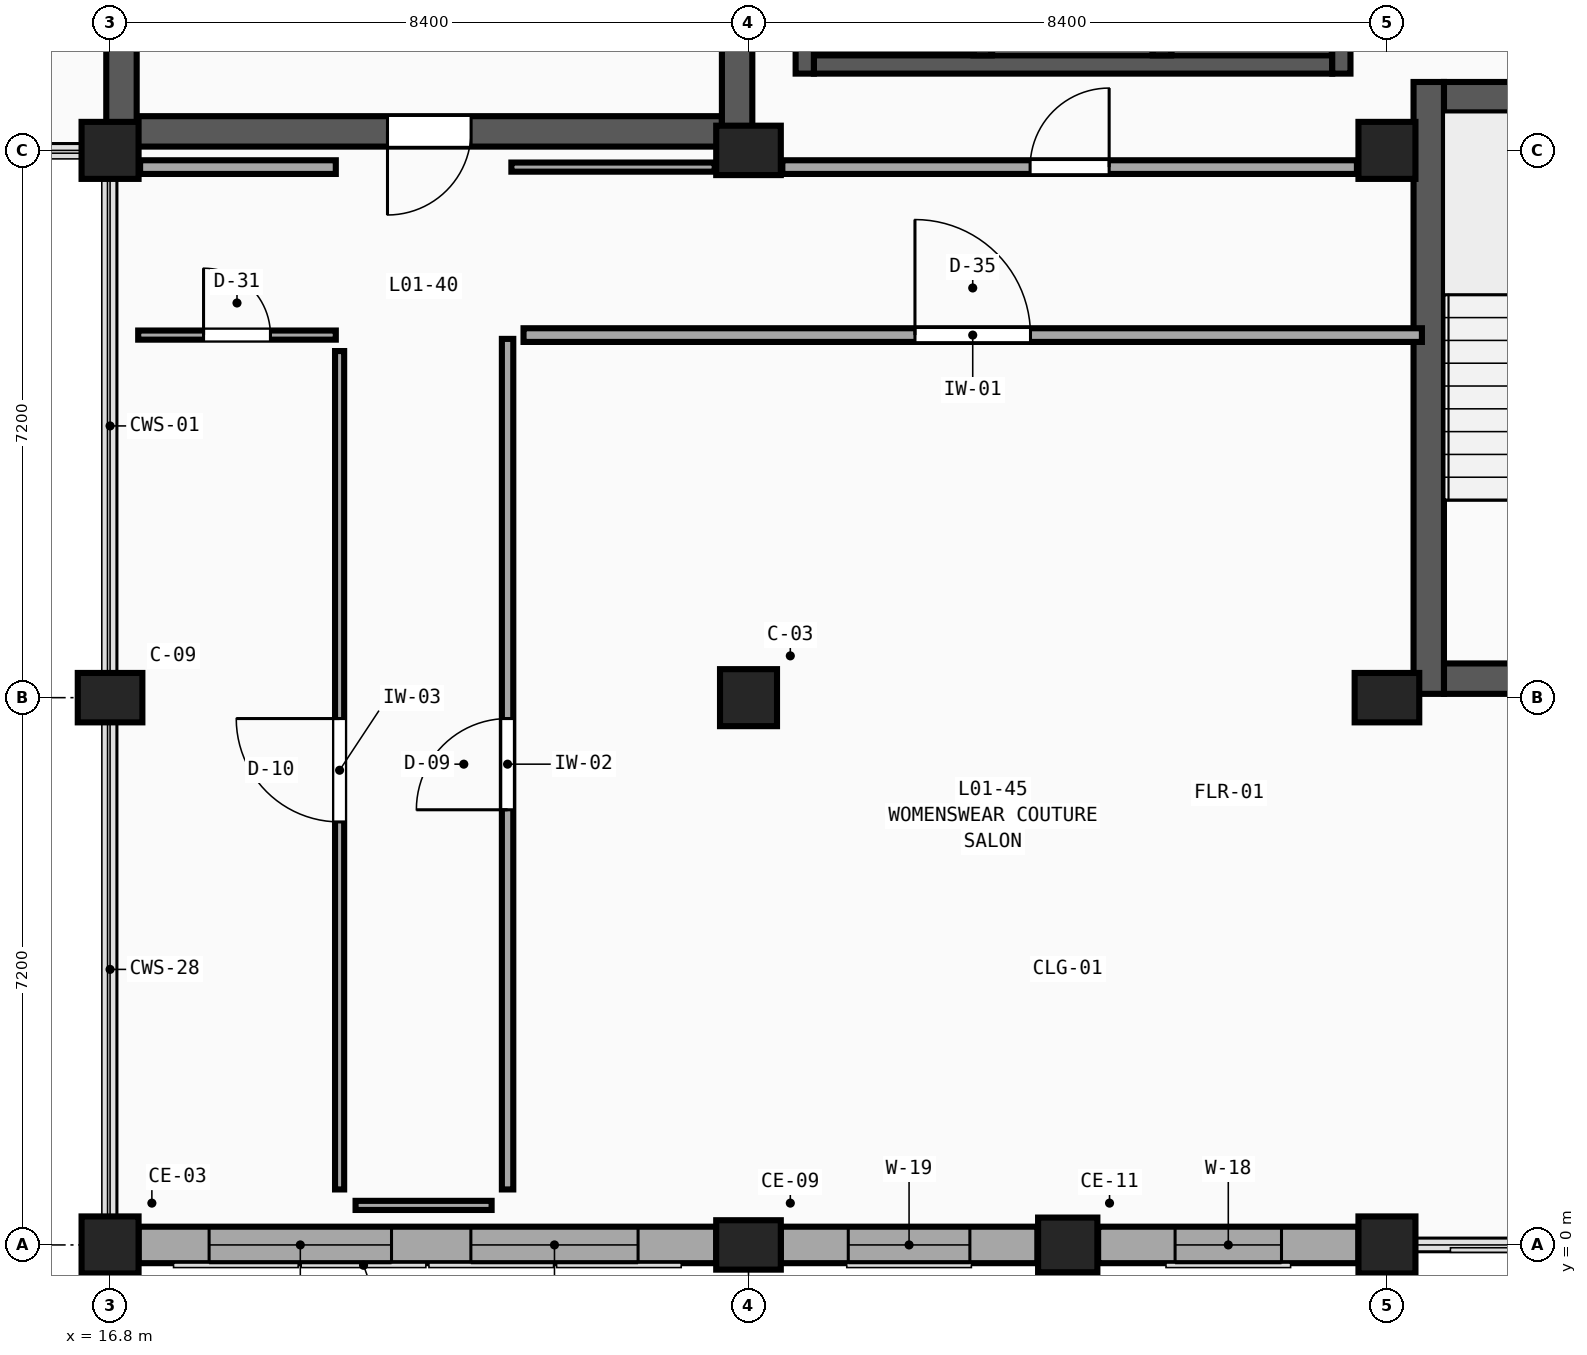
"""IFC4 building model, lengths in metres.
Left out: names, types, materials, properties, quantities, classifications, styles, units other than length and angle.
Written with IfcOpenShell. Run it as: python <this file> out.ifc"""

import sys

from ifc_helpers import new_model, si_unit, direction, frame, frame_2d, origin, origin_2d, place, context, subcontext, project, spatial, rectangle, extrude, element, fill, save


model = new_model("IFC4")
c1 = context("Model", 3, precision=1e-05, world=origin(), true_north=direction((0.0, 1.0)))
c2 = subcontext(c1, "Body", "Model", "MODEL_VIEW")
j1 = project(units=[si_unit("LENGTHUNIT", "METRE"), si_unit("PLANEANGLEUNIT", "RADIAN")], contexts=[c1])
p1 = place(None, origin())
s1 = spatial("IfcSite", under=j1, at=p1, CompositionType="ELEMENT")
p2 = place(p1, origin())
s2 = spatial("IfcBuilding", under=s1, at=p2, CompositionType="ELEMENT")
p3 = place(p2, frame((0.0, 0.0, 5.4)))
s3 = spatial("IfcBuildingStorey", under=s2, at=p3, CompositionType="ELEMENT", Elevation=5.4)
p4 = place(p3, frame((16.8, 0.0, 0.0), z_axis=(0.0, 0.0, 1.0), x_axis=(1.0, 0.0, 0.0)))
e1 = element("IfcColumn", 1, at=p4, inside=s3, PredefinedType="COLUMN", context=c2, shape_type="SweptSolid", body=[
    extrude(rectangle(XDim=0.75, YDim=0.75, at=origin_2d()), origin(), (0.0, 0.0, 1.0), 4.5),
])
p5 = place(p3, frame((16.8, 7.2, 0.0), z_axis=(0.0, 0.0, 1.0), x_axis=(1.0, 0.0, 0.0)))
e2 = element("IfcColumn", 2, at=p5, inside=s3, PredefinedType="COLUMN", context=c2, shape_type="SweptSolid", body=[
    extrude(rectangle(XDim=0.85, YDim=0.65, at=origin_2d()), origin(), (0.0, 0.0, 1.0), 4.5),
])
p6 = place(p3, frame((16.8, 14.4, 0.0), z_axis=(0.0, 0.0, 1.0), x_axis=(1.0, 0.0, 0.0)))
e3 = element("IfcColumn", 3, at=p6, inside=s3, PredefinedType="COLUMN", context=c2, shape_type="SweptSolid", body=[
    extrude(rectangle(XDim=0.75, YDim=0.75, at=origin_2d()), origin(), (0.0, 0.0, 1.0), 4.5),
])
p7 = place(p3, frame((25.2, 0.0, 0.0), z_axis=(0.0, 0.0, 1.0), x_axis=(1.0, 0.0, 0.0)))
e4 = element("IfcColumn", 4, at=p7, inside=s3, PredefinedType="COLUMN", context=c2, shape_type="SweptSolid", body=[
    extrude(rectangle(XDim=0.85, YDim=0.65, at=origin_2d()), origin(), (0.0, 0.0, 1.0), 4.5),
])
p8 = place(p3, frame((25.2, 7.2, 0.0), z_axis=(0.0, 0.0, 1.0), x_axis=(1.0, 0.0, 0.0)))
e5 = element("IfcColumn", 5, at=p8, inside=s3, PredefinedType="COLUMN", context=c2, shape_type="SweptSolid", body=[
    extrude(rectangle(XDim=0.75, YDim=0.75, at=origin_2d()), origin(), (0.0, 0.0, 1.0), 4.5),
])
p9 = place(p3, frame((25.2, 14.4, 0.0), z_axis=(0.0, 0.0, 1.0), x_axis=(1.0, 0.0, 0.0)))
e6 = element("IfcColumn", 6, at=p9, inside=s3, PredefinedType="COLUMN", context=c2, shape_type="SweptSolid", body=[
    extrude(rectangle(XDim=0.85, YDim=0.65, at=origin_2d()), origin(), (0.0, 0.0, 1.0), 4.5),
])
p10 = place(p3, frame((33.6, 0.0, 0.0), z_axis=(0.0, 0.0, 1.0), x_axis=(1.0, 0.0, 0.0)))
e7 = element("IfcColumn", 7, at=p10, inside=s3, PredefinedType="COLUMN", context=c2, shape_type="SweptSolid", body=[
    extrude(rectangle(XDim=0.75, YDim=0.75, at=origin_2d()), origin(), (0.0, 0.0, 1.0), 4.5),
])
p11 = place(p3, frame((33.6, 7.2, 0.0), z_axis=(0.0, 0.0, 1.0), x_axis=(1.0, 0.0, 0.0)))
e8 = element("IfcColumn", 8, at=p11, inside=s3, PredefinedType="COLUMN", context=c2, shape_type="SweptSolid", body=[
    extrude(rectangle(XDim=0.85, YDim=0.65, at=origin_2d()), origin(), (0.0, 0.0, 1.0), 4.5),
])
p12 = place(p3, frame((33.6, 14.4, 0.0), z_axis=(0.0, 0.0, 1.0), x_axis=(1.0, 0.0, 0.0)))
e9 = element("IfcColumn", 9, at=p12, inside=s3, PredefinedType="COLUMN", context=c2, shape_type="SweptSolid", body=[
    extrude(rectangle(XDim=0.75, YDim=0.75, at=origin_2d()), origin(), (0.0, 0.0, 1.0), 4.5),
])
p13 = place(p3, frame((29.4, 0.0, 0.0), z_axis=(0.0, 0.0, 1.0), x_axis=(1.0, 0.0, 0.0)))
e10 = element("IfcColumn", 10, at=p13, inside=s3, PredefinedType="PILASTER", context=c2, shape_type="SweptSolid", body=[
    extrude(rectangle(XDim=0.78, YDim=0.72, at=origin_2d()), origin(), (0.0, 0.0, 1.0), 4.5),
])
p14 = place(p3, frame((24.775, 0.0, 0.0), z_axis=(0.0, 0.0, 1.0), x_axis=(-1.0, 0.0, 0.0)))
e11 = element("IfcWall", 11, at=p14, inside=s3, PredefinedType="SOLIDWALL", context=c2, shape_type="SweptSolid", body=[
    extrude(rectangle(XDim=7.6, YDim=0.48, at=frame_2d((3.8, 0.0))), origin(), (0.0, 0.0, 1.0), 3.63),
])
p15 = place(p14, frame((1.028, 0.0, 0.75)))
e12 = element("IfcOpeningElement", 12, at=p15, cuts=e11, PredefinedType="OPENING", context=c2, shape_type="SweptSolid", body=[
    extrude(rectangle(XDim=2.2, YDim=2.08, at=frame_2d((1.1, 1.04))), frame((0.0, 0.26, 0.0), z_axis=(0.0, -1.0, 0.0), x_axis=(1.0, 0.0, 0.0)), (0.0, 0.0, 1.0), 0.52),
])
p16 = place(p14, frame((4.272, 0.0, 0.75)))
e13 = element("IfcOpeningElement", 13, at=p16, cuts=e11, PredefinedType="OPENING", context=c2, shape_type="SweptSolid", body=[
    extrude(rectangle(XDim=2.4, YDim=2.08, at=frame_2d((1.2, 1.04))), frame((0.0, 0.26, 0.0), z_axis=(0.0, -1.0, 0.0), x_axis=(1.0, 0.0, 0.0)), (0.0, 0.0, 1.0), 0.52),
])
p17 = place(p3, frame((33.225, 0.0, 0.0), z_axis=(0.0, 0.0, 1.0), x_axis=(-1.0, 0.0, 0.0)))
e14 = element("IfcWall", 14, at=p17, inside=s3, PredefinedType="SOLIDWALL", context=c2, shape_type="SweptSolid", body=[
    extrude(rectangle(XDim=3.425, YDim=0.48, at=frame_2d((1.712, 0.0))), origin(), (0.0, 0.0, 1.0), 3.63),
])
p18 = place(p17, frame((1.012, 0.0, 0.75)))
e15 = element("IfcOpeningElement", 15, at=p18, cuts=e14, PredefinedType="OPENING", context=c2, shape_type="SweptSolid", body=[
    extrude(rectangle(XDim=1.4, YDim=2.26, at=frame_2d((0.7, 1.13))), frame((0.0, 0.26, 0.0), z_axis=(0.0, -1.0, 0.0), x_axis=(1.0, 0.0, 0.0)), (0.0, 0.0, 1.0), 0.52),
])
p19 = place(p3, frame((29.0, 0.0, 0.0), z_axis=(0.0, 0.0, 1.0), x_axis=(-1.0, 0.0, 0.0)))
e16 = element("IfcWall", 16, at=p19, inside=s3, PredefinedType="SOLIDWALL", context=c2, shape_type="SweptSolid", body=[
    extrude(rectangle(XDim=3.375, YDim=0.48, at=frame_2d((1.688, 0.0))), origin(), (0.0, 0.0, 1.0), 3.63),
])
p20 = place(p19, frame((0.887, 0.0, 0.75)))
e17 = element("IfcOpeningElement", 17, at=p20, cuts=e16, PredefinedType="OPENING", context=c2, shape_type="SweptSolid", body=[
    extrude(rectangle(XDim=1.6, YDim=2.26, at=frame_2d((0.8, 1.13))), frame((0.0, 0.26, 0.0), z_axis=(0.0, -1.0, 0.0), x_axis=(1.0, 0.0, 0.0)), (0.0, 0.0, 1.0), 0.52),
])
p21 = place(p3, frame((24.85, 14.65, 0.0), z_axis=(0.0, 0.0, 1.0), x_axis=(-1.0, 0.0, 0.0)))
e18 = element("IfcWall", 18, at=p21, inside=s3, PredefinedType="SHEAR", context=c2, shape_type="SweptSolid", body=[
    extrude(rectangle(XDim=7.7, YDim=0.4, at=frame_2d((3.85, 0.0))), origin(), (0.0, 0.0, 1.0), 4.5),
])
p22 = place(p21, frame((3.3, 0.0, 0.0)))
e19 = element("IfcOpeningElement", 19, at=p22, cuts=e18, PredefinedType="OPENING", context=c2, shape_type="SweptSolid", body=[
    extrude(rectangle(XDim=1.1, YDim=2.2, at=frame_2d((0.55, 1.1))), frame((0.0, 0.22, 0.0), z_axis=(0.0, -1.0, 0.0), x_axis=(1.0, 0.0, 0.0)), (0.0, 0.0, 1.0), 0.44),
])
for number, where, z_axis, x_axis in (
    (20, (16.95, 22.9, 0.0), (0.0, 0.0, 1.0), (0.0, -1.0, 0.0)),
    (21, (25.05, 14.45, 0.0), (0.0, 0.0, 1.0), (0.0, 1.0, 0.0)),
):
    element("IfcWall", number, at=place(p3, frame(where, z_axis=z_axis, x_axis=x_axis)), inside=s3, PredefinedType="SHEAR", context=c2, shape_type="SweptSolid", body=[
        extrude(rectangle(XDim=8.45, YDim=0.4, at=frame_2d((4.225, 0.0))), origin(), (0.0, 0.0, 1.0), 4.5),
    ])
p23 = place(p3, frame((41.25, 7.45, 0.0), z_axis=(0.0, 0.0, 1.0), x_axis=(-1.0, 0.0, 0.0)))
e22 = element("IfcWall", 22, at=p23, inside=s3, PredefinedType="SHEAR", context=c2, shape_type="SweptSolid", body=[
    extrude(rectangle(XDim=6.9, YDim=0.4, at=frame_2d((3.45, 0.0))), origin(), (0.0, 0.0, 1.0), 4.5),
])
p24 = place(p23, frame((2.9, 0.0, 0.0)))
e23 = element("IfcOpeningElement", 23, at=p24, cuts=e22, PredefinedType="OPENING", context=c2, shape_type="SweptSolid", body=[
    extrude(rectangle(XDim=1.1, YDim=2.2, at=frame_2d((0.55, 1.1))), frame((0.0, 0.22, 0.0), z_axis=(0.0, -1.0, 0.0), x_axis=(1.0, 0.0, 0.0)), (0.0, 0.0, 1.0), 0.44),
])
p25 = place(p3, frame((34.35, 15.1, 0.0), z_axis=(0.0, 0.0, 1.0), x_axis=(1.0, 0.0, 0.0)))
e24 = element("IfcWall", 24, at=p25, inside=s3, PredefinedType="SHEAR", context=c2, shape_type="SweptSolid", body=[
    extrude(rectangle(XDim=6.9, YDim=0.4, at=frame_2d((3.45, 0.0))), origin(), (0.0, 0.0, 1.0), 4.5),
])
p26 = place(p3, frame((34.15, 15.3, 0.0), z_axis=(0.0, 0.0, 1.0), x_axis=(0.0, -1.0, 0.0)))
e25 = element("IfcWall", 25, at=p26, inside=s3, PredefinedType="SHEAR", context=c2, shape_type="SweptSolid", body=[
    extrude(rectangle(XDim=8.05, YDim=0.4, at=frame_2d((4.025, 0.0))), origin(), (0.0, 0.0, 1.0), 4.5),
])
p27 = place(p3, frame((26.06, 15.53, 0.0), z_axis=(0.0, 0.0, 1.0), x_axis=(1.0, 0.0, 0.0)))
e26 = element("IfcWall", 26, at=p27, inside=s3, PredefinedType="SHEAR", context=c2, shape_type="SweptSolid", body=[
    extrude(rectangle(XDim=6.82, YDim=0.24, at=frame_2d((3.41, 0.0))), origin(), (0.0, 0.0, 1.0), 4.18),
])
for number, where, z_axis, x_axis in (
    (27, (25.94, 18.39, 0.0), (0.0, 0.0, 1.0), (0.0, -1.0, 0.0)),
    (28, (33.0, 15.41, 0.0), (0.0, 0.0, 1.0), (0.0, 1.0, 0.0)),
):
    element("IfcWall", number, at=place(p3, frame(where, z_axis=z_axis, x_axis=x_axis)), inside=s3, PredefinedType="SHEAR", context=c2, shape_type="SweptSolid", body=[
        extrude(rectangle(XDim=2.98, YDim=0.24, at=frame_2d((1.49, 0.0))), origin(), (0.0, 0.0, 1.0), 4.18),
    ])
for number, where, z_axis, x_axis in (
    (29, (28.28, 15.65, 0.0), (0.0, 0.0, 1.0), (0.0, 1.0, 0.0)),
    (30, (30.64, 15.65, 0.0), (0.0, 0.0, 1.0), (0.0, 1.0, 0.0)),
):
    element("IfcWall", number, at=place(p3, frame(where, z_axis=z_axis, x_axis=x_axis)), inside=s3, PredefinedType="SHEAR", context=c2, shape_type="SweptSolid", body=[
        extrude(rectangle(XDim=2.5, YDim=0.24, at=frame_2d((1.25, 0.0))), origin(), (0.0, 0.0, 1.0), 4.18),
    ])
p28 = place(p3, frame((22.08, 14.18, 0.0), z_axis=(0.0, 0.0, 1.0), x_axis=(1.0, 0.0, 0.0)))
e31 = element("IfcWall", 31, at=p28, inside=s3, PredefinedType="PARTITIONING", context=c2, shape_type="SweptSolid", body=[
    extrude(rectangle(XDim=2.675, YDim=0.12, at=frame_2d((1.337, 0.0))), origin(), (0.0, 0.0, 1.0), 3.73),
])
p29 = place(p3, frame((25.645, 14.18, 0.0), z_axis=(0.0, 0.0, 1.0), x_axis=(1.0, 0.0, 0.0)))
e32 = element("IfcWall", 32, at=p29, inside=s3, PredefinedType="PARTITIONING", context=c2, shape_type="SweptSolid", body=[
    extrude(rectangle(XDim=7.56, YDim=0.18, at=frame_2d((3.78, 0.0))), origin(), (0.0, 0.0, 1.0), 3.73),
])
p30 = place(p29, frame((3.26, 0.0, 0.0)))
e33 = element("IfcOpeningElement", 33, at=p30, cuts=e32, PredefinedType="OPENING", context=c2, shape_type="SweptSolid", body=[
    extrude(rectangle(XDim=1.04, YDim=2.45, at=frame_2d((0.52, 1.225))), frame((0.0, 0.11, 0.0), z_axis=(0.0, -1.0, 0.0), x_axis=(1.0, 0.0, 0.0)), (0.0, 0.0, 1.0), 0.22),
])
p31 = place(p3, frame((22.24, 11.97, 0.0), z_axis=(0.0, 0.0, 1.0), x_axis=(1.0, 0.0, 0.0)))
e34 = element("IfcWall", 34, at=p31, inside=s3, PredefinedType="PARTITIONING", context=c2, shape_type="SweptSolid", body=[
    extrude(rectangle(XDim=11.82, YDim=0.18, at=frame_2d((5.91, 0.0))), origin(), (0.0, 0.0, 1.0), 4.18),
])
p32 = place(p31, frame((5.15, 0.0, 0.0)))
e35 = element("IfcOpeningElement", 35, at=p32, cuts=e34, PredefinedType="OPENING", context=c2, shape_type="SweptSolid", body=[
    extrude(rectangle(XDim=1.52, YDim=2.45, at=frame_2d((0.76, 1.225))), frame((0.0, 0.11, 0.0), z_axis=(0.0, -1.0, 0.0), x_axis=(1.0, 0.0, 0.0)), (0.0, 0.0, 1.0), 0.22),
])
p33 = place(p3, frame((22.03, 0.73, 0.0), z_axis=(0.0, 0.0, 1.0), x_axis=(0.0, 1.0, 0.0)))
e36 = element("IfcWall", 36, at=p33, inside=s3, PredefinedType="PARTITIONING", context=c2, shape_type="SweptSolid", body=[
    extrude(rectangle(XDim=11.19, YDim=0.15, at=frame_2d((5.595, 0.0))), origin(), (0.0, 0.0, 1.0), 4.18),
])
p34 = place(p33, frame((4.995, 0.0, 0.0)))
e37 = element("IfcOpeningElement", 37, at=p34, cuts=e36, PredefinedType="OPENING", context=c2, shape_type="SweptSolid", body=[
    extrude(rectangle(XDim=1.2, YDim=2.13, at=frame_2d((0.6, 1.065))), frame((0.0, 0.095, 0.0), z_axis=(0.0, -1.0, 0.0), x_axis=(1.0, 0.0, 0.0)), (0.0, 0.0, 1.0), 0.19),
])
p35 = place(p3, frame((19.82, 0.73, 0.0), z_axis=(0.0, 0.0, 1.0), x_axis=(0.0, 1.0, 0.0)))
e38 = element("IfcWall", 38, at=p35, inside=s3, PredefinedType="PARTITIONING", context=c2, shape_type="SweptSolid", body=[
    extrude(rectangle(XDim=11.03, YDim=0.12, at=frame_2d((5.515, 0.0))), origin(), (0.0, 0.0, 1.0), 4.18),
])
p36 = place(p35, frame((4.835, 0.0, 0.0)))
e39 = element("IfcOpeningElement", 39, at=p36, cuts=e38, PredefinedType="OPENING", context=c2, shape_type="SweptSolid", body=[
    extrude(rectangle(XDim=1.36, YDim=2.13, at=frame_2d((0.68, 1.065))), frame((0.0, 0.08, 0.0), z_axis=(0.0, -1.0, 0.0), x_axis=(1.0, 0.0, 0.0)), (0.0, 0.0, 1.0), 0.16),
])
p37 = place(p3, frame((17.17, 11.97, 0.0), z_axis=(0.0, 0.0, 1.0), x_axis=(1.0, 0.0, 0.0)))
e40 = element("IfcWall", 40, at=p37, inside=s3, PredefinedType="PARTITIONING", context=c2, shape_type="SweptSolid", body=[
    extrude(rectangle(XDim=2.6, YDim=0.12, at=frame_2d((1.3, 0.0))), origin(), (0.0, 0.0, 1.0), 4.18),
])
p38 = place(p37, frame((0.86, 0.0, 0.0)))
e41 = element("IfcOpeningElement", 41, at=p38, cuts=e40, PredefinedType="OPENING", context=c2, shape_type="SweptSolid", body=[
    extrude(rectangle(XDim=0.88, YDim=2.45, at=frame_2d((0.44, 1.225))), frame((0.0, 0.08, 0.0), z_axis=(0.0, -1.0, 0.0), x_axis=(1.0, 0.0, 0.0)), (0.0, 0.0, 1.0), 0.16),
])
p39 = place(p3, frame((17.195, 14.18, 0.0), z_axis=(0.0, 0.0, 1.0), x_axis=(1.0, 0.0, 0.0)))
e42 = element("IfcWall", 42, at=p39, inside=s3, PredefinedType="PARTITIONING", context=c2, shape_type="SweptSolid", body=[
    extrude(rectangle(XDim=2.575, YDim=0.18, at=frame_2d((1.288, 0.0))), origin(), (0.0, 0.0, 1.0), 3.73),
])
p40 = place(p3, frame((20.03, 0.52, 0.0), z_axis=(0.0, 0.0, 1.0), x_axis=(1.0, 0.0, 0.0)))
e43 = element("IfcWall", 43, at=p40, inside=s3, PredefinedType="PARTITIONING", context=c2, shape_type="SweptSolid", body=[
    extrude(rectangle(XDim=1.79, YDim=0.12, at=frame_2d((0.895, 0.0))), origin(), (0.0, 0.0, 1.0), 3.63),
])
p41 = place(p15, origin())
e44 = element("IfcWindow", 44, at=p41, inside=s3, PartitioningType="TRIPLE_PANEL_VERTICAL", PredefinedType="WINDOW", context=c2, shape_type="SweptSolid", body=[
    extrude(rectangle(XDim=2.2, YDim=2.08, at=frame_2d((1.1, 1.04))), frame((0.0, 0.03, 0.0), z_axis=(0.0, -1.0, 0.0), x_axis=(1.0, 0.0, 0.0)), (0.0, 0.0, 1.0), 0.06),
])
fill(e12, e44)
p42 = place(p16, origin())
e45 = element("IfcWindow", 45, at=p42, inside=s3, PartitioningType="TRIPLE_PANEL_VERTICAL", PredefinedType="WINDOW", context=c2, shape_type="SweptSolid", body=[
    extrude(rectangle(XDim=2.4, YDim=2.08, at=frame_2d((1.2, 1.04))), frame((0.0, 0.03, 0.0), z_axis=(0.0, -1.0, 0.0), x_axis=(1.0, 0.0, 0.0)), (0.0, 0.0, 1.0), 0.06),
])
fill(e13, e45)
p43 = place(p18, origin())
e46 = element("IfcWindow", 46, at=p43, inside=s3, PartitioningType="DOUBLE_PANEL_VERTICAL", PredefinedType="WINDOW", context=c2, shape_type="SweptSolid", body=[
    extrude(rectangle(XDim=1.4, YDim=2.26, at=frame_2d((0.7, 1.13))), frame((0.0, 0.03, 0.0), z_axis=(0.0, -1.0, 0.0), x_axis=(1.0, 0.0, 0.0)), (0.0, 0.0, 1.0), 0.06),
])
fill(e15, e46)
p44 = place(p20, origin())
e47 = element("IfcWindow", 47, at=p44, inside=s3, PartitioningType="DOUBLE_PANEL_VERTICAL", PredefinedType="WINDOW", context=c2, shape_type="SweptSolid", body=[
    extrude(rectangle(XDim=1.6, YDim=2.26, at=frame_2d((0.8, 1.13))), frame((0.0, 0.03, 0.0), z_axis=(0.0, -1.0, 0.0), x_axis=(1.0, 0.0, 0.0)), (0.0, 0.0, 1.0), 0.06),
])
fill(e17, e47)
p45 = place(p22, origin())
e48 = element("IfcDoor", 48, at=p45, inside=s3, OperationType="SINGLE_SWING_RIGHT", PredefinedType="DOOR", context=c2, shape_type="SweptSolid", body=[
    extrude(rectangle(XDim=1.1, YDim=2.2, at=frame_2d((0.55, 1.1))), frame((0.0, 0.025, 0.0), z_axis=(0.0, -1.0, 0.0), x_axis=(1.0, 0.0, 0.0)), (0.0, 0.0, 1.0), 0.05),
])
fill(e19, e48)
p46 = place(p30, origin())
e49 = element("IfcDoor", 49, at=p46, inside=s3, OperationType="SINGLE_SWING_RIGHT", PredefinedType="DOOR", context=c2, shape_type="SweptSolid", body=[
    extrude(rectangle(XDim=1.04, YDim=2.45, at=frame_2d((0.52, 1.225))), frame((0.0, 0.025, 0.0), z_axis=(0.0, -1.0, 0.0), x_axis=(1.0, 0.0, 0.0)), (0.0, 0.0, 1.0), 0.05),
])
fill(e33, e49)
p47 = place(p32, origin())
e50 = element("IfcDoor", 50, at=p47, inside=s3, OperationType="SINGLE_SWING_LEFT", PredefinedType="DOOR", context=c2, shape_type="SweptSolid", body=[
    extrude(rectangle(XDim=1.52, YDim=2.45, at=frame_2d((0.76, 1.225))), frame((0.0, 0.025, 0.0), z_axis=(0.0, -1.0, 0.0), x_axis=(1.0, 0.0, 0.0)), (0.0, 0.0, 1.0), 0.05),
])
fill(e35, e50)
p48 = place(p34, origin())
e51 = element("IfcDoor", 51, at=p48, inside=s3, OperationType="SINGLE_SWING_LEFT", PredefinedType="DOOR", context=c2, shape_type="SweptSolid", body=[
    extrude(rectangle(XDim=1.2, YDim=2.13, at=frame_2d((0.6, 1.065))), frame((0.0, 0.025, 0.0), z_axis=(0.0, -1.0, 0.0), x_axis=(1.0, 0.0, 0.0)), (0.0, 0.0, 1.0), 0.05),
])
fill(e37, e51)
p49 = place(p36, origin())
e52 = element("IfcDoor", 52, at=p49, inside=s3, OperationType="SINGLE_SWING_RIGHT", PredefinedType="DOOR", context=c2, shape_type="SweptSolid", body=[
    extrude(rectangle(XDim=1.36, YDim=2.13, at=frame_2d((0.68, 1.065))), frame((0.0, 0.025, 0.0), z_axis=(0.0, -1.0, 0.0), x_axis=(1.0, 0.0, 0.0)), (0.0, 0.0, 1.0), 0.05),
])
fill(e39, e52)
p50 = place(p38, origin())
e53 = element("IfcDoor", 53, at=p50, inside=s3, OperationType="SINGLE_SWING_LEFT", PredefinedType="DOOR", context=c2, shape_type="SweptSolid", body=[
    extrude(rectangle(XDim=0.88, YDim=2.45, at=frame_2d((0.44, 1.225))), frame((0.0, 0.025, 0.0), z_axis=(0.0, -1.0, 0.0), x_axis=(1.0, 0.0, 0.0)), (0.0, 0.0, 1.0), 0.05),
])
fill(e41, e53)
save(model, sys.argv[1])
